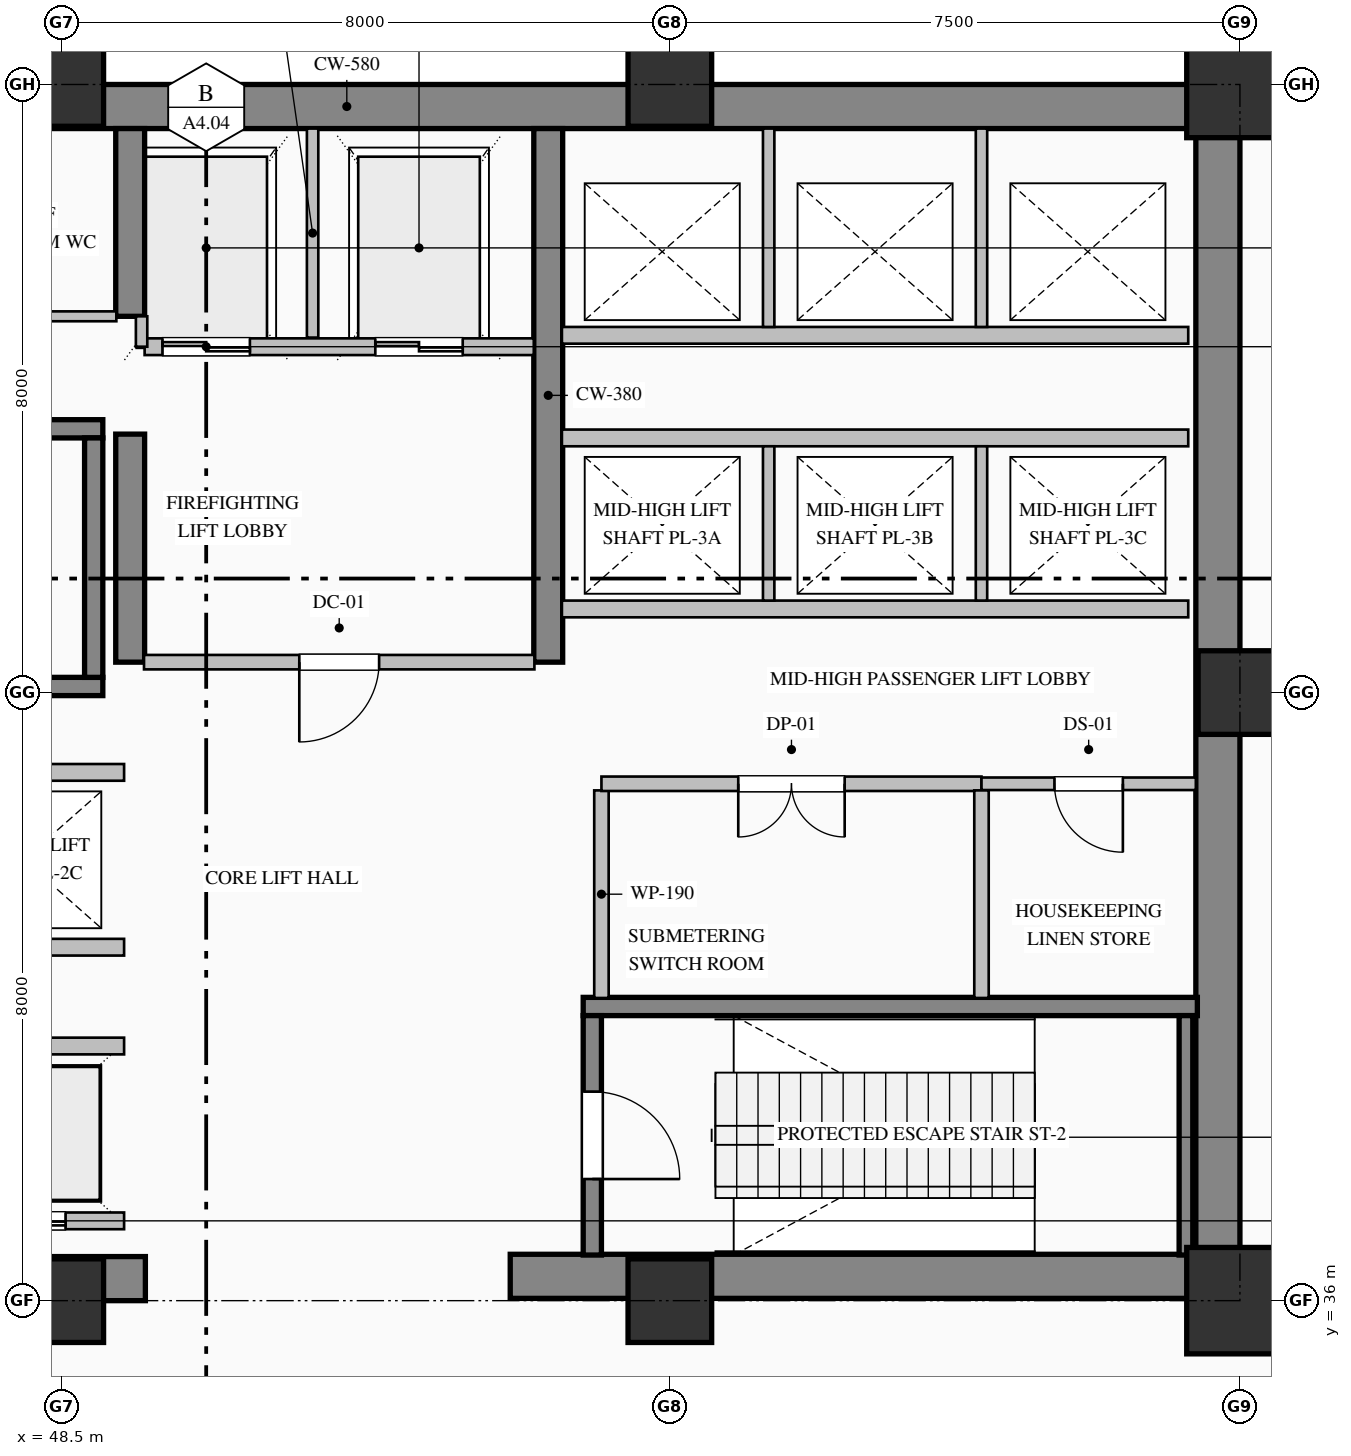
"""IFC4 building model, lengths in metres.
Left out: names, types, materials, properties, quantities, classifications, styles, units other than length and angle.
Written with IfcOpenShell. Run it as: python <this file> out.ifc"""

import sys

from ifc_helpers import new_model, si_unit, direction, frame, frame_2d, origin, origin_2d, place, context, subcontext, project, spatial, rectangle, hollow_rectangle, extrude, element, fill, save


model = new_model("IFC4")
c1 = context("Model", 3, precision=1e-05, world=origin(), true_north=direction((0.0, 1.0)))
c2 = subcontext(c1, "Body", "Model", "MODEL_VIEW")
j1 = project(units=[si_unit("LENGTHUNIT", "METRE"), si_unit("PLANEANGLEUNIT", "RADIAN")], contexts=[c1])
p1 = place(None, origin())
s1 = spatial("IfcSite", under=j1, at=p1, CompositionType="ELEMENT")
p2 = place(p1, origin())
s2 = spatial("IfcBuilding", under=s1, at=p2, CompositionType="ELEMENT")
p3 = place(p2, frame((0.0, 0.0, 11.4)))
s3 = spatial("IfcBuildingStorey", under=s2, at=p3, CompositionType="ELEMENT", Elevation=11.4)
p4 = place(p3, frame((40.5, 51.71, 0.0), z_axis=(0.0, 0.0, 1.0), x_axis=(1.0, 0.0, 0.0)))
e1 = element("IfcWall", 1, at=p4, inside=s3, PredefinedType="SHEAR", context=c2, shape_type="SweptSolid", body=[
    extrude(rectangle(XDim=23.5, YDim=0.58, at=frame_2d((11.75, 0.0))), origin(), (0.0, 0.0, 1.0), 5.55),
])
p5 = place(p3, frame((63.71, 36.32, 0.0), z_axis=(0.0, 0.0, 1.0), x_axis=(0.0, 1.0, 0.0)))
e2 = element("IfcWall", 2, at=p5, inside=s3, PredefinedType="SHEAR", context=c2, shape_type="SweptSolid", body=[
    extrude(rectangle(XDim=15.1, YDim=0.58, at=frame_2d((7.55, 0.0))), origin(), (0.0, 0.0, 1.0), 5.55),
])
p6 = place(p3, frame((48.2, 36.29, 0.0), z_axis=(0.0, 0.0, 1.0), x_axis=(1.0, 0.0, 0.0)))
e3 = element("IfcWall", 3, at=p6, inside=s3, PredefinedType="SHEAR", context=c2, shape_type="SweptSolid", body=[
    extrude(rectangle(XDim=1.4, YDim=0.58, at=frame_2d((0.7, 0.0))), origin(), (0.0, 0.0, 1.0), 5.55),
])
p7 = place(p3, frame((54.4, 36.32, 0.0), z_axis=(0.0, 0.0, 1.0), x_axis=(1.0, 0.0, 0.0)))
e4 = element("IfcWall", 4, at=p7, inside=s3, PredefinedType="SHEAR", context=c2, shape_type="SweptSolid", body=[
    extrude(rectangle(XDim=9.6, YDim=0.58, at=frame_2d((4.8, 0.0))), origin(), (0.0, 0.0, 1.0), 6.0),
])
p8 = place(p3, frame((49.4, 44.4, 0.0), z_axis=(0.0, 0.0, 1.0), x_axis=(0.0, 1.0, 0.0)))
e5 = element("IfcWall", 5, at=p8, inside=s3, PredefinedType="SHEAR", context=c2, shape_type="SweptSolid", body=[
    extrude(rectangle(XDim=3.0, YDim=0.38, at=frame_2d((1.5, 0.0))), origin(), (0.0, 0.0, 1.0), 5.55),
])
p9 = place(p3, frame((49.4, 48.95, 0.0), z_axis=(0.0, 0.0, 1.0), x_axis=(0.0, 1.0, 0.0)))
e6 = element("IfcWall", 6, at=p9, inside=s3, PredefinedType="SHEAR", context=c2, shape_type="SweptSolid", body=[
    extrude(rectangle(XDim=2.47, YDim=0.38, at=frame_2d((1.235, 0.0))), origin(), (0.0, 0.0, 1.0), 5.55),
])
p10 = place(p3, frame((54.9, 44.4, 0.0), z_axis=(0.0, 0.0, 1.0), x_axis=(0.0, 1.0, 0.0)))
e7 = element("IfcWall", 7, at=p10, inside=s3, PredefinedType="SHEAR", context=c2, shape_type="SweptSolid", body=[
    extrude(rectangle(XDim=7.02, YDim=0.38, at=frame_2d((3.51, 0.0))), origin(), (0.0, 0.0, 1.0), 5.55),
])
p11 = place(p3, frame((48.5, 36.0, 0.0), z_axis=(0.0, 0.0, 1.0), x_axis=(1.0, 0.0, 0.0)))
e8 = element("IfcColumn", 8, at=p11, inside=s3, PredefinedType="COLUMN", context=c2, shape_type="SweptSolid", body=[
    extrude(rectangle(XDim=1.1, YDim=1.1, at=origin_2d()), origin(), (0.0, 0.0, 1.0), 6.0),
])
p12 = place(p3, frame((48.5, 52.0, 0.0), z_axis=(0.0, 0.0, 1.0), x_axis=(1.0, 0.0, 0.0)))
e9 = element("IfcColumn", 9, at=p12, inside=s3, PredefinedType="COLUMN", context=c2, shape_type="SweptSolid", body=[
    extrude(hollow_rectangle(XDim=1.1, YDim=1.1, WallThickness=0.04, at=origin_2d()), origin(), (0.0, 0.0, 1.0), 6.0),
])
p13 = place(p3, frame((56.5, 36.0, 0.0), z_axis=(0.0, 0.0, 1.0), x_axis=(1.0, 0.0, 0.0)))
e10 = element("IfcColumn", 10, at=p13, inside=s3, PredefinedType="COLUMN", context=c2, shape_type="SweptSolid", body=[
    extrude(rectangle(XDim=1.1, YDim=1.1, at=origin_2d()), origin(), (0.0, 0.0, 1.0), 6.0),
])
p14 = place(p3, frame((56.5, 52.0, 0.0), z_axis=(0.0, 0.0, 1.0), x_axis=(1.0, 0.0, 0.0)))
e11 = element("IfcColumn", 11, at=p14, inside=s3, PredefinedType="COLUMN", context=c2, shape_type="SweptSolid", body=[
    extrude(hollow_rectangle(XDim=1.1, YDim=1.1, WallThickness=0.04, at=origin_2d()), origin(), (0.0, 0.0, 1.0), 6.0),
])
p15 = place(p3, frame((64.0, 36.0, 0.0), z_axis=(0.0, 0.0, 1.0), x_axis=(1.0, 0.0, 0.0)))
e12 = element("IfcColumn", 12, at=p15, inside=s3, PredefinedType="COLUMN", context=c2, shape_type="SweptSolid", body=[
    extrude(hollow_rectangle(XDim=1.4, YDim=1.4, WallThickness=0.05, at=origin_2d()), origin(), (0.0, 0.0, 1.0), 6.0),
])
p16 = place(p3, frame((64.0, 44.0, 0.0), z_axis=(0.0, 0.0, 1.0), x_axis=(1.0, 0.0, 0.0)))
e13 = element("IfcColumn", 13, at=p16, inside=s3, PredefinedType="COLUMN", context=c2, shape_type="SweptSolid", body=[
    extrude(rectangle(XDim=1.1, YDim=1.1, at=origin_2d()), origin(), (0.0, 0.0, 1.0), 6.0),
])
p17 = place(p3, frame((64.0, 52.0, 0.0), z_axis=(0.0, 0.0, 1.0), x_axis=(1.0, 0.0, 0.0)))
e14 = element("IfcColumn", 14, at=p17, inside=s3, PredefinedType="COLUMN", context=c2, shape_type="SweptSolid", body=[
    extrude(hollow_rectangle(XDim=1.4, YDim=1.4, WallThickness=0.05, at=origin_2d()), origin(), (0.0, 0.0, 1.0), 6.0),
])
p18 = place(p3, frame((63.98, 51.81, 0.0), z_axis=(0.0, 0.0, 1.0), x_axis=(1.0, 0.0, 0.0)))
e15 = element("IfcWall", 15, at=p18, inside=s3, PredefinedType="SOLIDWALL", context=c2, shape_type="SweptSolid", body=[
    extrude(rectangle(XDim=4.02, YDim=0.38, at=frame_2d((2.01, 0.0))), origin(), (0.0, 0.0, 1.0), 5.55),
])
for number, where, z_axis, x_axis in (
    (16, (40.96, 47.47, 0.0), (0.0, 0.0, 1.0), (1.0, 0.0, 0.0)),
    (17, (49.04, 44.08, 0.0), (0.0, 0.0, 1.0), (-1.0, 0.0, 0.0)),
):
    element("IfcWall", number, at=place(p3, frame(where, z_axis=z_axis, x_axis=x_axis)), inside=s3, PredefinedType="SOLIDWALL", context=c2, shape_type="SweptSolid", body=[
        extrude(rectangle(XDim=8.08, YDim=0.24, at=frame_2d((4.04, 0.0))), origin(), (0.0, 0.0, 1.0), 6.0),
    ])
p19 = place(p3, frame((48.92, 44.2, 0.0), z_axis=(0.0, 0.0, 1.0), x_axis=(0.0, 1.0, 0.0)))
e18 = element("IfcWall", 18, at=p19, inside=s3, PredefinedType="SOLIDWALL", context=c2, shape_type="SweptSolid", body=[
    extrude(rectangle(XDim=3.15, YDim=0.24, at=frame_2d((1.575, 0.0))), origin(), (0.0, 0.0, 1.0), 6.0),
])
p20 = place(p3, frame((55.36, 39.87, 0.0), z_axis=(0.0, 0.0, 1.0), x_axis=(1.0, 0.0, 0.0)))
e19 = element("IfcWall", 19, at=p20, inside=s3, PredefinedType="SOLIDWALL", context=c2, shape_type="SweptSolid", body=[
    extrude(rectangle(XDim=8.08, YDim=0.24, at=frame_2d((4.04, 0.0))), origin(), (0.0, 0.0, 1.0), 6.0),
])
p21 = place(p3, frame((55.48, 39.75, 0.0), z_axis=(0.0, 0.0, 1.0), x_axis=(0.0, -1.0, 0.0)))
e20 = element("IfcWall", 20, at=p21, inside=s3, PredefinedType="SOLIDWALL", context=c2, shape_type="SweptSolid", body=[
    extrude(rectangle(XDim=3.15, YDim=0.24, at=frame_2d((1.575, 0.0))), origin(), (0.0, 0.0, 1.0), 6.0),
])
p22 = place(p21, frame((1.0, 0.0, 0.0)))
e21 = element("IfcOpeningElement", 21, at=p22, cuts=e20, PredefinedType="OPENING", context=c2, shape_type="SweptSolid", body=[
    extrude(rectangle(XDim=1.15, YDim=2.2, at=frame_2d((0.575, 1.1))), frame((0.0, 0.13, 0.0), z_axis=(0.0, -1.0, 0.0), x_axis=(1.0, 0.0, 0.0)), (0.0, 0.0, 1.0), 0.26),
])
p23 = place(p3, frame((63.29, 36.6, 0.0), z_axis=(0.0, 0.0, 1.0), x_axis=(0.0, 1.0, 0.0)))
e22 = element("IfcWall", 22, at=p23, inside=s3, PredefinedType="SOLIDWALL", context=c2, shape_type="SweptSolid", body=[
    extrude(rectangle(XDim=3.15, YDim=0.18, at=frame_2d((1.575, 0.0))), origin(), (0.0, 0.0, 1.0), 6.0),
])
p24 = place(p3, frame((54.71, 48.55, 0.0), z_axis=(0.0, 0.0, 1.0), x_axis=(-1.0, 0.0, 0.0)))
e23 = element("IfcWall", 23, at=p24, inside=s3, PredefinedType="PARTITIONING", context=c2, shape_type="SweptSolid", body=[
    extrude(rectangle(XDim=5.12, YDim=0.22, at=frame_2d((2.56, 0.0))), origin(), (0.0, 0.0, 1.0), 5.55),
])
p25 = place(p24, frame((3.735, 0.0, 0.0)))
e24 = element("IfcOpeningElement", 24, at=p25, cuts=e23, PredefinedType="OPENING", context=c2, shape_type="SweptSolid", body=[
    extrude(rectangle(XDim=1.15, YDim=2.2, at=frame_2d((0.575, 1.1))), frame((0.0, 0.12, 0.0), z_axis=(0.0, -1.0, 0.0), x_axis=(1.0, 0.0, 0.0)), (0.0, 0.0, 1.0), 0.24),
])
p26 = place(p24, frame((0.935, 0.0, 0.0)))
e25 = element("IfcOpeningElement", 25, at=p26, cuts=e23, PredefinedType="OPENING", context=c2, shape_type="SweptSolid", body=[
    extrude(rectangle(XDim=1.15, YDim=2.2, at=frame_2d((0.575, 1.1))), frame((0.0, 0.12, 0.0), z_axis=(0.0, -1.0, 0.0), x_axis=(1.0, 0.0, 0.0)), (0.0, 0.0, 1.0), 0.24),
])
p27 = place(p3, frame((51.8, 48.67, 0.0), z_axis=(0.0, 0.0, 1.0), x_axis=(0.0, 1.0, 0.0)))
e26 = element("IfcWall", 26, at=p27, inside=s3, PredefinedType="PARTITIONING", context=c2, shape_type="SweptSolid", body=[
    extrude(rectangle(XDim=2.75, YDim=0.15, at=frame_2d((1.375, 0.0))), origin(), (0.0, 0.0, 1.0), 5.55),
])
p28 = place(p3, frame((49.55, 48.55, 0.0), z_axis=(0.0, 0.0, 1.0), x_axis=(0.0, 1.0, 0.0)))
e27 = element("IfcWall", 27, at=p28, inside=s3, PredefinedType="PARTITIONING", context=c2, shape_type="SweptSolid", body=[
    extrude(rectangle(XDim=0.4, YDim=0.15, at=frame_2d((0.2, 0.0))), origin(), (0.0, 0.0, 1.0), 5.55),
])
p29 = place(p3, frame((49.32, 37.05, 0.0), z_axis=(0.0, 0.0, 1.0), x_axis=(-1.0, 0.0, 0.0)))
e28 = element("IfcWall", 28, at=p29, inside=s3, PredefinedType="PARTITIONING", context=c2, shape_type="SweptSolid", body=[
    extrude(rectangle(XDim=8.24, YDim=0.22, at=frame_2d((4.12, 0.0))), origin(), (0.0, 0.0, 1.0), 5.55),
])
p30 = place(p29, frame((6.37, 0.0, 0.0)))
e29 = element("IfcOpeningElement", 29, at=p30, cuts=e28, PredefinedType="OPENING", context=c2, shape_type="SweptSolid", body=[
    extrude(rectangle(XDim=1.1, YDim=2.2, at=frame_2d((0.55, 1.1))), frame((0.0, 0.12, 0.0), z_axis=(0.0, -1.0, 0.0), x_axis=(1.0, 0.0, 0.0)), (0.0, 0.0, 1.0), 0.24),
])
p31 = place(p29, frame((3.57, 0.0, 0.0)))
e30 = element("IfcOpeningElement", 30, at=p31, cuts=e28, PredefinedType="OPENING", context=c2, shape_type="SweptSolid", body=[
    extrude(rectangle(XDim=1.1, YDim=2.2, at=frame_2d((0.55, 1.1))), frame((0.0, 0.12, 0.0), z_axis=(0.0, -1.0, 0.0), x_axis=(1.0, 0.0, 0.0)), (0.0, 0.0, 1.0), 0.24),
])
p32 = place(p29, frame((0.77, 0.0, 0.0)))
e31 = element("IfcOpeningElement", 31, at=p32, cuts=e28, PredefinedType="OPENING", context=c2, shape_type="SweptSolid", body=[
    extrude(rectangle(XDim=1.1, YDim=2.2, at=frame_2d((0.55, 1.1))), frame((0.0, 0.12, 0.0), z_axis=(0.0, -1.0, 0.0), x_axis=(1.0, 0.0, 0.0)), (0.0, 0.0, 1.0), 0.24),
])
for number, where, z_axis, x_axis in (
    (32, (41.08, 39.35, 0.0), (0.0, 0.0, 1.0), (1.0, 0.0, 0.0)),
    (33, (49.32, 40.65, 0.0), (0.0, 0.0, 1.0), (-1.0, 0.0, 0.0)),
    (34, (41.08, 42.95, 0.0), (0.0, 0.0, 1.0), (1.0, 0.0, 0.0)),
    (35, (63.32, 45.1, 0.0), (0.0, 0.0, 1.0), (-1.0, 0.0, 0.0)),
    (36, (55.08, 47.35, 0.0), (0.0, 0.0, 1.0), (1.0, 0.0, 0.0)),
):
    element("IfcWall", number, at=place(p3, frame(where, z_axis=z_axis, x_axis=x_axis)), inside=s3, PredefinedType="PARTITIONING", context=c2, shape_type="SweptSolid", body=[
        extrude(rectangle(XDim=8.24, YDim=0.22, at=frame_2d((4.12, 0.0))), origin(), (0.0, 0.0, 1.0), 5.55),
    ])
for number, where, z_axis, x_axis in (
    (37, (57.8, 45.21, 0.0), (0.0, 0.0, 1.0), (0.0, 1.0, 0.0)),
    (38, (60.6, 45.21, 0.0), (0.0, 0.0, 1.0), (0.0, 1.0, 0.0)),
):
    element("IfcWall", number, at=place(p3, frame(where, z_axis=z_axis, x_axis=x_axis)), inside=s3, PredefinedType="PARTITIONING", context=c2, shape_type="SweptSolid", body=[
        extrude(rectangle(XDim=2.03, YDim=0.15, at=frame_2d((1.015, 0.0))), origin(), (0.0, 0.0, 1.0), 5.55),
    ])
p33 = place(p3, frame((63.32, 48.7, 0.0), z_axis=(0.0, 0.0, 1.0), x_axis=(-1.0, 0.0, 0.0)))
e39 = element("IfcWall", 39, at=p33, inside=s3, PredefinedType="PARTITIONING", context=c2, shape_type="SweptSolid", body=[
    extrude(rectangle(XDim=8.24, YDim=0.22, at=frame_2d((4.12, 0.0))), origin(), (0.0, 0.0, 1.0), 5.55),
])
for number, where, z_axis, x_axis in (
    (40, (57.8, 48.81, 0.0), (0.0, 0.0, 1.0), (0.0, 1.0, 0.0)),
    (41, (60.6, 48.81, 0.0), (0.0, 0.0, 1.0), (0.0, 1.0, 0.0)),
):
    element("IfcWall", number, at=place(p3, frame(where, z_axis=z_axis, x_axis=x_axis)), inside=s3, PredefinedType="PARTITIONING", context=c2, shape_type="SweptSolid", body=[
        extrude(rectangle(XDim=2.61, YDim=0.15, at=frame_2d((1.305, 0.0))), origin(), (0.0, 0.0, 1.0), 5.55),
    ])
p34 = place(p3, frame((43.5, 48.95, 0.0), z_axis=(0.0, 0.0, 1.0), x_axis=(1.0, 0.0, 0.0)))
e42 = element("IfcWall", 42, at=p34, inside=s3, PredefinedType="PARTITIONING", context=c2, shape_type="SweptSolid", body=[
    extrude(rectangle(XDim=5.718, YDim=0.13, at=frame_2d((2.859, 0.0))), origin(), (0.0, 0.0, 1.0), 5.55),
])
p35 = place(p34, frame((2.399, 0.0, 0.0)))
e43 = element("IfcOpeningElement", 43, at=p35, cuts=e42, PredefinedType="OPENING", context=c2, shape_type="SweptSolid", body=[
    extrude(rectangle(XDim=0.92, YDim=2.15, at=frame_2d((0.46, 1.075))), frame((0.0, 0.075, 0.0), z_axis=(0.0, -1.0, 0.0), x_axis=(1.0, 0.0, 0.0)), (0.0, 0.0, 1.0), 0.15),
])
p36 = place(p3, frame((54.718, 44.4, 0.0), z_axis=(0.0, 0.0, 1.0), x_axis=(-1.0, 0.0, 0.0)))
e44 = element("IfcWall", 44, at=p36, inside=s3, PredefinedType="PARTITIONING", context=c2, shape_type="SweptSolid", body=[
    extrude(rectangle(XDim=5.136, YDim=0.19, at=frame_2d((2.568, 0.0))), origin(), (0.0, 0.0, 1.0), 5.55),
])
p37 = place(p36, frame((2.043, 0.0, 0.0)))
e45 = element("IfcOpeningElement", 45, at=p37, cuts=e44, PredefinedType="OPENING", context=c2, shape_type="SweptSolid", body=[
    extrude(rectangle(XDim=1.05, YDim=2.15, at=frame_2d((0.525, 1.075))), frame((0.0, 0.105, 0.0), z_axis=(0.0, -1.0, 0.0), x_axis=(1.0, 0.0, 0.0)), (0.0, 0.0, 1.0), 0.21),
])
p38 = place(p3, frame((55.6, 42.713, 0.0), z_axis=(0.0, 0.0, 1.0), x_axis=(0.0, -1.0, 0.0)))
e46 = element("IfcWall", 46, at=p38, inside=s3, PredefinedType="PARTITIONING", context=c2, shape_type="SweptSolid", body=[
    extrude(rectangle(XDim=2.731, YDim=0.19, at=frame_2d((1.365, 0.0))), origin(), (0.0, 0.0, 1.0), 5.55),
])
p39 = place(p3, frame((60.6, 42.8, 0.0), z_axis=(0.0, 0.0, 1.0), x_axis=(-1.0, 0.0, 0.0)))
e47 = element("IfcWall", 47, at=p39, inside=s3, PredefinedType="PARTITIONING", context=c2, shape_type="SweptSolid", body=[
    extrude(rectangle(XDim=5.0, YDim=0.19, at=frame_2d((2.5, 0.0))), origin(), (0.0, 0.0, 1.0), 5.55),
])
p40 = place(p39, frame((1.8, 0.0, 0.0)))
e48 = element("IfcOpeningElement", 48, at=p40, cuts=e47, PredefinedType="OPENING", context=c2, shape_type="SweptSolid", body=[
    extrude(rectangle(XDim=1.4, YDim=2.25, at=frame_2d((0.7, 1.125))), frame((0.0, 0.105, 0.0), z_axis=(0.0, -1.0, 0.0), x_axis=(1.0, 0.0, 0.0)), (0.0, 0.0, 1.0), 0.21),
])
p41 = place(p3, frame((63.42, 42.8, 0.0), z_axis=(0.0, 0.0, 1.0), x_axis=(-1.0, 0.0, 0.0)))
e49 = element("IfcWall", 49, at=p41, inside=s3, PredefinedType="PARTITIONING", context=c2, shape_type="SweptSolid", body=[
    extrude(rectangle(XDim=2.82, YDim=0.165, at=frame_2d((1.41, 0.0))), origin(), (0.0, 0.0, 1.0), 5.55),
])
p42 = place(p41, frame((0.96, 0.0, 0.0)))
e50 = element("IfcOpeningElement", 50, at=p42, cuts=e49, PredefinedType="OPENING", context=c2, shape_type="SweptSolid", body=[
    extrude(rectangle(XDim=0.9, YDim=2.15, at=frame_2d((0.45, 1.075))), frame((0.0, 0.093, 0.0), z_axis=(0.0, -1.0, 0.0), x_axis=(1.0, 0.0, 0.0)), (0.0, 0.0, 1.0), 0.185),
])
p43 = place(p3, frame((60.6, 42.713, 0.0), z_axis=(0.0, 0.0, 1.0), x_axis=(0.0, -1.0, 0.0)))
e51 = element("IfcWall", 51, at=p43, inside=s3, PredefinedType="PARTITIONING", context=c2, shape_type="SweptSolid", body=[
    extrude(rectangle(XDim=2.731, YDim=0.19, at=frame_2d((1.365, 0.0))), origin(), (0.0, 0.0, 1.0), 5.55),
])
p44 = place(p22, origin())
e52 = element("IfcDoor", 52, at=p44, inside=s3, OperationType="SINGLE_SWING_RIGHT", PredefinedType="DOOR", context=c2, shape_type="SweptSolid", body=[
    extrude(rectangle(XDim=1.15, YDim=2.2, at=frame_2d((0.575, 1.1))), frame((0.0, 0.025, 0.0), z_axis=(0.0, -1.0, 0.0), x_axis=(1.0, 0.0, 0.0)), (0.0, 0.0, 1.0), 0.05),
])
fill(e21, e52)
p45 = place(p25, origin())
e53 = element("IfcDoor", 53, at=p45, inside=s3, OperationType="DOUBLE_DOOR_SLIDING", PredefinedType="DOOR", context=c2, shape_type="SweptSolid", body=[
    extrude(rectangle(XDim=1.15, YDim=2.2, at=frame_2d((0.575, 1.1))), frame((0.0, 0.025, 0.0), z_axis=(0.0, -1.0, 0.0), x_axis=(1.0, 0.0, 0.0)), (0.0, 0.0, 1.0), 0.05),
])
fill(e24, e53)
p46 = place(p26, origin())
e54 = element("IfcDoor", 54, at=p46, inside=s3, OperationType="DOUBLE_DOOR_SLIDING", PredefinedType="DOOR", context=c2, shape_type="SweptSolid", body=[
    extrude(rectangle(XDim=1.15, YDim=2.2, at=frame_2d((0.575, 1.1))), frame((0.0, 0.025, 0.0), z_axis=(0.0, -1.0, 0.0), x_axis=(1.0, 0.0, 0.0)), (0.0, 0.0, 1.0), 0.05),
])
fill(e25, e54)
p47 = place(p32, origin())
e55 = element("IfcDoor", 55, at=p47, inside=s3, OperationType="DOUBLE_DOOR_SLIDING", PredefinedType="DOOR", context=c2, shape_type="SweptSolid", body=[
    extrude(rectangle(XDim=1.1, YDim=2.2, at=frame_2d((0.55, 1.1))), frame((0.0, 0.025, 0.0), z_axis=(0.0, -1.0, 0.0), x_axis=(1.0, 0.0, 0.0)), (0.0, 0.0, 1.0), 0.05),
])
fill(e31, e55)
p48 = place(p37, origin())
e56 = element("IfcDoor", 56, at=p48, inside=s3, OperationType="SINGLE_SWING_RIGHT", PredefinedType="DOOR", context=c2, shape_type="SweptSolid", body=[
    extrude(rectangle(XDim=1.05, YDim=2.15, at=frame_2d((0.525, 1.075))), frame((0.0, 0.025, 0.0), z_axis=(0.0, -1.0, 0.0), x_axis=(1.0, 0.0, 0.0)), (0.0, 0.0, 1.0), 0.05),
])
fill(e45, e56)
p49 = place(p40, origin())
e57 = element("IfcDoor", 57, at=p49, inside=s3, OperationType="DOUBLE_DOOR_SINGLE_SWING", PredefinedType="DOOR", context=c2, shape_type="SweptSolid", body=[
    extrude(rectangle(XDim=1.4, YDim=2.25, at=frame_2d((0.7, 1.125))), frame((0.0, 0.025, 0.0), z_axis=(0.0, -1.0, 0.0), x_axis=(1.0, 0.0, 0.0)), (0.0, 0.0, 1.0), 0.05),
])
fill(e48, e57)
p50 = place(p42, origin())
e58 = element("IfcDoor", 58, at=p50, inside=s3, OperationType="SINGLE_SWING_LEFT", PredefinedType="DOOR", context=c2, shape_type="SweptSolid", body=[
    extrude(rectangle(XDim=0.9, YDim=2.15, at=frame_2d((0.45, 1.075))), frame((0.0, 0.025, 0.0), z_axis=(0.0, -1.0, 0.0), x_axis=(1.0, 0.0, 0.0)), (0.0, 0.0, 1.0), 0.05),
])
fill(e50, e58)
save(model, sys.argv[1])
